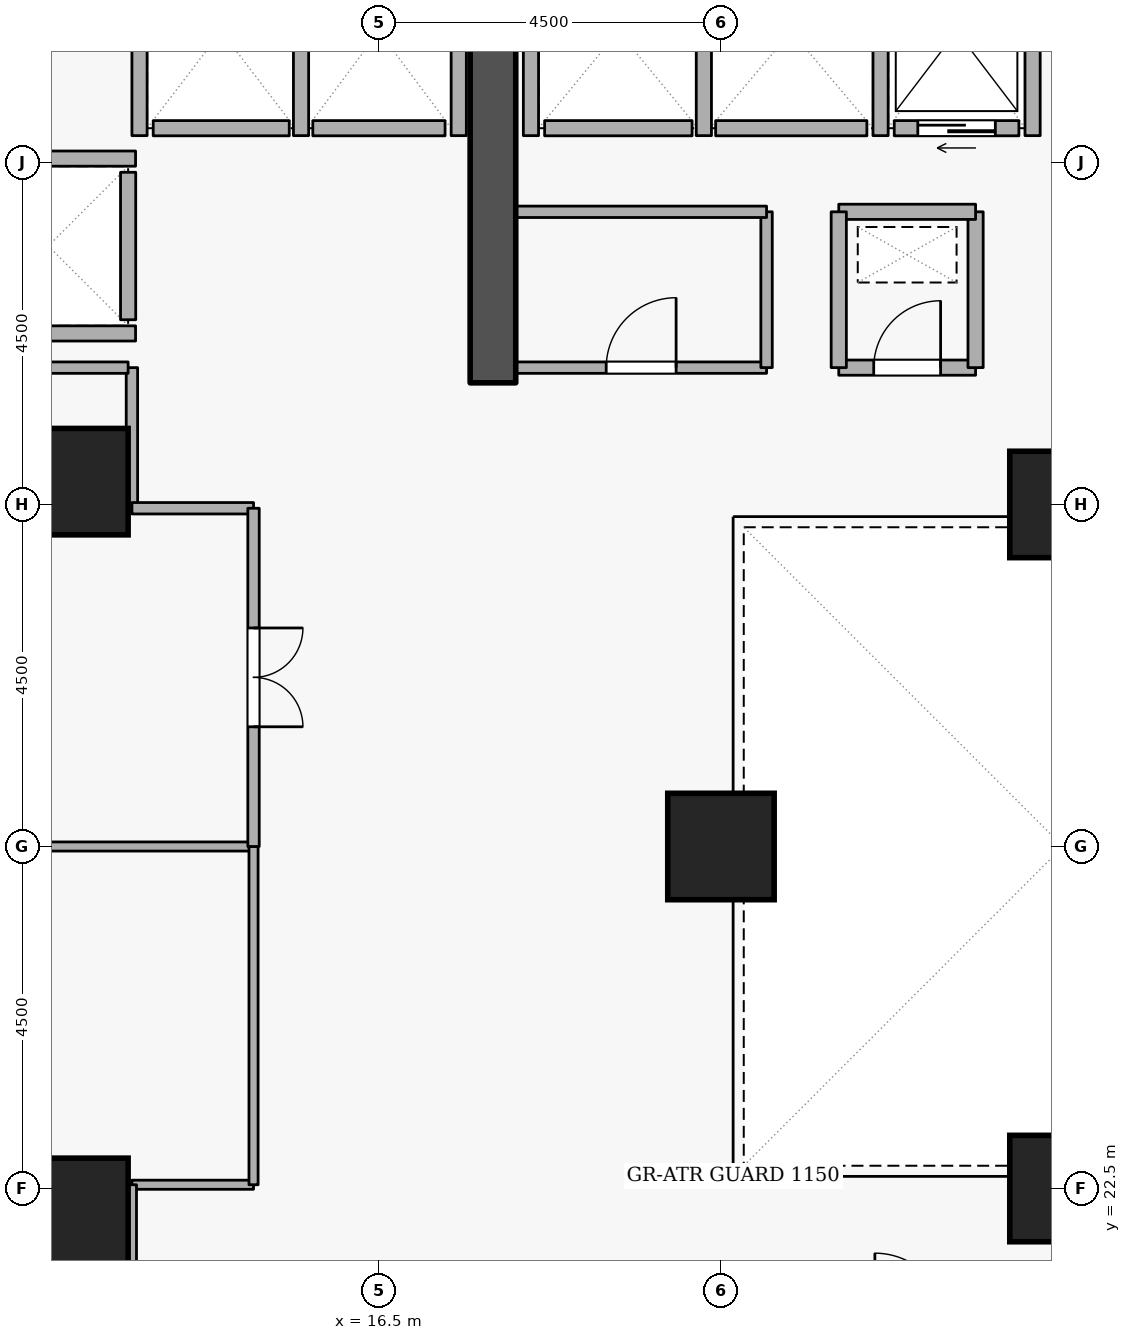
"""IFC4 building model, lengths in metres.
Left out: names, types, materials, properties, quantities, classifications, styles, units other than length and angle.
Written with IfcOpenShell. Run it as: python <this file> out.ifc"""

import sys

from ifc_helpers import new_model, si_unit, direction, frame, frame_2d, origin, origin_2d, place, context, subcontext, project, spatial, rectangle, extrude, element, fill, save


model = new_model("IFC4")
c1 = context("Model", 3, precision=1e-05, world=origin(), true_north=direction((0.0, 1.0)))
c2 = subcontext(c1, "Body", "Model", "MODEL_VIEW")
j1 = project(units=[si_unit("LENGTHUNIT", "METRE"), si_unit("PLANEANGLEUNIT", "RADIAN")], contexts=[c1])
p1 = place(None, origin())
s1 = spatial("IfcSite", under=j1, at=p1, CompositionType="ELEMENT")
p2 = place(p1, origin())
s2 = spatial("IfcBuilding", under=s1, at=p2, CompositionType="ELEMENT")
p3 = place(p2, frame((0.0, 0.0, 27.9)))
s3 = spatial("IfcBuildingStorey", under=s2, at=p3, CompositionType="ELEMENT", Elevation=27.9)
p4 = place(p3, frame((18.0, 33.1, 0.0), z_axis=(0.0, 0.0, 1.0), x_axis=(0.0, 1.0, 0.0)))
e1 = element("IfcWall", 1, at=p4, inside=s3, PredefinedType="SHEAR", context=c2, shape_type="SweptSolid", body=[
    extrude(rectangle(XDim=5.7, YDim=0.6, at=frame_2d((2.85, 0.0))), origin(), (0.0, 0.0, 1.0), 3.6),
])
for number, where, z_axis, x_axis in (
    (2, (12.5, 22.2, 0.0), (0.0, 0.0, 1.0), (1.0, 0.0, 0.0)),
    (3, (12.5, 31.8, 0.0), (0.0, 0.0, 1.0), (1.0, 0.0, 0.0)),
    (4, (25.5, 22.5, 0.0), (0.0, 0.0, 1.0), (1.0, 0.0, 0.0)),
    (5, (25.5, 31.5, 0.0), (0.0, 0.0, 1.0), (1.0, 0.0, 0.0)),
    (6, (21.0, 27.0, 0.0), (0.0, 0.0, 1.0), (1.0, 0.0, 0.0)),
):
    element("IfcColumn", number, at=place(p3, frame(where, z_axis=z_axis, x_axis=x_axis)), inside=s3, PredefinedType="COLUMN", context=c2, shape_type="SweptSolid", body=[
        extrude(rectangle(XDim=1.4, YDim=1.4, at=origin_2d()), origin(), (0.0, 0.0, 1.0), 3.6),
    ])
p5 = place(p3, frame((24.92, 36.45, 0.0), z_axis=(0.0, 0.0, 1.0), x_axis=(-1.0, 0.0, 0.0)))
e7 = element("IfcWall", 7, at=p5, inside=s3, PredefinedType="STANDARD", context=c2, shape_type="SweptSolid", body=[
    extrude(rectangle(XDim=1.64, YDim=0.2, at=frame_2d((0.82, 0.0))), origin(), (0.0, 0.0, 1.0), 3.34),
])
p6 = place(p5, frame((0.31, 0.0, 0.0)))
e8 = element("IfcOpeningElement", 8, at=p6, cuts=e7, PredefinedType="OPENING", context=c2, shape_type="SweptSolid", body=[
    extrude(rectangle(XDim=1.02, YDim=2.06, at=frame_2d((0.51, 1.03))), frame((0.0, 0.11, 0.0), z_axis=(0.0, -1.0, 0.0), x_axis=(1.0, 0.0, 0.0)), (0.0, 0.0, 1.0), 0.22),
])
p7 = place(p3, frame((22.92, 36.45, 0.0), z_axis=(0.0, 0.0, 1.0), x_axis=(-1.0, 0.0, 0.0)))
e9 = element("IfcWall", 9, at=p7, inside=s3, PredefinedType="STANDARD", context=c2, shape_type="SweptSolid", body=[
    extrude(rectangle(XDim=1.99, YDim=0.2, at=frame_2d((0.995, 0.0))), origin(), (0.0, 0.0, 1.0), 3.34),
])
p8 = place(p3, frame((20.62, 36.45, 0.0), z_axis=(0.0, 0.0, 1.0), x_axis=(-1.0, 0.0, 0.0)))
e10 = element("IfcWall", 10, at=p8, inside=s3, PredefinedType="STANDARD", context=c2, shape_type="SweptSolid", body=[
    extrude(rectangle(XDim=1.94, YDim=0.2, at=frame_2d((0.97, 0.0))), origin(), (0.0, 0.0, 1.0), 3.34),
])
p9 = place(p3, frame((17.37, 36.45, 0.0), z_axis=(0.0, 0.0, 1.0), x_axis=(-1.0, 0.0, 0.0)))
e11 = element("IfcWall", 11, at=p9, inside=s3, PredefinedType="STANDARD", context=c2, shape_type="SweptSolid", body=[
    extrude(rectangle(XDim=1.74, YDim=0.2, at=frame_2d((0.87, 0.0))), origin(), (0.0, 0.0, 1.0), 3.34),
])
p10 = place(p3, frame((15.32, 36.45, 0.0), z_axis=(0.0, 0.0, 1.0), x_axis=(-1.0, 0.0, 0.0)))
e12 = element("IfcWall", 12, at=p10, inside=s3, PredefinedType="STANDARD", context=c2, shape_type="SweptSolid", body=[
    extrude(rectangle(XDim=1.79, YDim=0.2, at=frame_2d((0.895, 0.0))), origin(), (0.0, 0.0, 1.0), 3.34),
])
p11 = place(p3, frame((13.2, 33.93, 0.0), z_axis=(0.0, 0.0, 1.0), x_axis=(0.0, 1.0, 0.0)))
e13 = element("IfcWall", 13, at=p11, inside=s3, PredefinedType="STANDARD", context=c2, shape_type="SweptSolid", body=[
    extrude(rectangle(XDim=1.94, YDim=0.2, at=frame_2d((0.97, 0.0))), origin(), (0.0, 0.0, 1.0), 3.34),
])
for number, where, z_axis, x_axis in (
    (14, (25.1, 36.352, 0.0), (0.0, 0.0, 1.0), (0.0, 1.0, 0.0)),
    (15, (23.1, 36.352, 0.0), (0.0, 0.0, 1.0), (0.0, 1.0, 0.0)),
    (16, (20.775, 36.352, 0.0), (0.0, 0.0, 1.0), (0.0, 1.0, 0.0)),
    (17, (18.5, 36.352, 0.0), (0.0, 0.0, 1.0), (0.0, 1.0, 0.0)),
):
    element("IfcWall", number, at=place(p3, frame(where, z_axis=z_axis, x_axis=x_axis)), inside=s3, PredefinedType="STANDARD", context=c2, shape_type="SweptSolid", body=[
        extrude(rectangle(XDim=2.436, YDim=0.2, at=frame_2d((1.218, 0.0))), origin(), (0.0, 0.0, 1.0), 3.34),
    ])
p12 = place(p3, frame((17.55, 36.352, 0.0), z_axis=(0.0, 0.0, 1.0), x_axis=(0.0, 1.0, 0.0)))
e18 = element("IfcWall", 18, at=p12, inside=s3, PredefinedType="STANDARD", context=c2, shape_type="SweptSolid", body=[
    extrude(rectangle(XDim=2.636, YDim=0.2, at=frame_2d((1.318, 0.0))), origin(), (0.0, 0.0, 1.0), 2.545),
])
for number, where, z_axis, x_axis in (
    (19, (15.475, 36.352, 0.0), (0.0, 0.0, 1.0), (0.0, 1.0, 0.0)),
    (20, (13.35, 36.352, 0.0), (0.0, 0.0, 1.0), (0.0, 1.0, 0.0)),
):
    element("IfcWall", number, at=place(p3, frame(where, z_axis=z_axis, x_axis=x_axis)), inside=s3, PredefinedType="STANDARD", context=c2, shape_type="SweptSolid", body=[
        extrude(rectangle(XDim=2.636, YDim=0.2, at=frame_2d((1.318, 0.0))), origin(), (0.0, 0.0, 1.0), 3.34),
    ])
for number, where, z_axis, x_axis in (
    (21, (11.002, 36.05, 0.0), (0.0, 0.0, 1.0), (1.0, 0.0, 0.0)),
    (22, (11.002, 33.75, 0.0), (0.0, 0.0, 1.0), (1.0, 0.0, 0.0)),
):
    element("IfcWall", number, at=place(p3, frame(where, z_axis=z_axis, x_axis=x_axis)), inside=s3, PredefinedType="STANDARD", context=c2, shape_type="SweptSolid", body=[
        extrude(rectangle(XDim=2.296, YDim=0.2, at=frame_2d((1.148, 0.0))), origin(), (0.0, 0.0, 1.0), 3.34),
    ])
p13 = place(p3, frame((22.55, 33.3, 0.0), z_axis=(0.0, 0.0, 1.0), x_axis=(1.0, 0.0, 0.0)))
e23 = element("IfcWall", 23, at=p13, inside=s3, PredefinedType="STANDARD", context=c2, shape_type="SweptSolid", body=[
    extrude(rectangle(XDim=1.8, YDim=0.2, at=frame_2d((0.9, 0.0))), origin(), (0.0, 0.0, 1.0), 3.34),
])
p14 = place(p13, frame((0.46, 0.0, 0.0)))
e24 = element("IfcOpeningElement", 24, at=p14, cuts=e23, PredefinedType="OPENING", context=c2, shape_type="SweptSolid", body=[
    extrude(rectangle(XDim=0.88, YDim=2.04, at=frame_2d((0.44, 1.02))), frame((0.0, 0.11, 0.0), z_axis=(0.0, -1.0, 0.0), x_axis=(1.0, 0.0, 0.0)), (0.0, 0.0, 1.0), 0.22),
])
p15 = place(p3, frame((24.35, 33.3, 0.0), z_axis=(0.0, 0.0, 1.0), x_axis=(0.0, 1.0, 0.0)))
e25 = element("IfcWall", 25, at=p15, inside=s3, PredefinedType="STANDARD", context=c2, shape_type="SweptSolid", body=[
    extrude(rectangle(XDim=2.05, YDim=0.2, at=frame_2d((1.025, 0.0))), origin(), (0.0, 0.0, 1.0), 3.34),
])
p16 = place(p3, frame((24.35, 35.35, 0.0), z_axis=(0.0, 0.0, 1.0), x_axis=(-1.0, 0.0, 0.0)))
e26 = element("IfcWall", 26, at=p16, inside=s3, PredefinedType="STANDARD", context=c2, shape_type="SweptSolid", body=[
    extrude(rectangle(XDim=1.8, YDim=0.2, at=frame_2d((0.9, 0.0))), origin(), (0.0, 0.0, 1.0), 3.34),
])
p17 = place(p3, frame((22.55, 35.35, 0.0), z_axis=(0.0, 0.0, 1.0), x_axis=(0.0, -1.0, 0.0)))
e27 = element("IfcWall", 27, at=p17, inside=s3, PredefinedType="STANDARD", context=c2, shape_type="SweptSolid", body=[
    extrude(rectangle(XDim=2.05, YDim=0.2, at=frame_2d((1.025, 0.0))), origin(), (0.0, 0.0, 1.0), 3.34),
])
p18 = place(p3, frame((18.3, 33.3, 0.0), z_axis=(0.0, 0.0, 1.0), x_axis=(1.0, 0.0, 0.0)))
e28 = element("IfcWall", 28, at=p18, inside=s3, PredefinedType="PARTITIONING", context=c2, shape_type="SweptSolid", body=[
    extrude(rectangle(XDim=3.3, YDim=0.15, at=frame_2d((1.65, 0.0))), origin(), (0.0, 0.0, 1.0), 3.34),
])
p19 = place(p18, frame((1.19, 0.0, 0.0)))
e29 = element("IfcOpeningElement", 29, at=p19, cuts=e28, PredefinedType="OPENING", context=c2, shape_type="SweptSolid", body=[
    extrude(rectangle(XDim=0.92, YDim=2.08, at=frame_2d((0.46, 1.04))), frame((0.0, 0.085, 0.0), z_axis=(0.0, -1.0, 0.0), x_axis=(1.0, 0.0, 0.0)), (0.0, 0.0, 1.0), 0.17),
])
p20 = place(p3, frame((21.6, 33.3, 0.0), z_axis=(0.0, 0.0, 1.0), x_axis=(0.0, 1.0, 0.0)))
e30 = element("IfcWall", 30, at=p20, inside=s3, PredefinedType="PARTITIONING", context=c2, shape_type="SweptSolid", body=[
    extrude(rectangle(XDim=2.05, YDim=0.15, at=frame_2d((1.025, 0.0))), origin(), (0.0, 0.0, 1.0), 3.34),
])
p21 = place(p3, frame((21.6, 35.35, 0.0), z_axis=(0.0, 0.0, 1.0), x_axis=(-1.0, 0.0, 0.0)))
e31 = element("IfcWall", 31, at=p21, inside=s3, PredefinedType="PARTITIONING", context=c2, shape_type="SweptSolid", body=[
    extrude(rectangle(XDim=3.3, YDim=0.15, at=frame_2d((1.65, 0.0))), origin(), (0.0, 0.0, 1.0), 3.34),
])
p22 = place(p3, frame((14.85, 22.55, 0.0), z_axis=(0.0, 0.0, 1.0), x_axis=(-1.0, 0.0, 0.0)))
e32 = element("IfcWall", 32, at=p22, inside=s3, PredefinedType="PARTITIONING", context=c2, shape_type="SweptSolid", body=[
    extrude(rectangle(XDim=1.6, YDim=0.12, at=frame_2d((0.8, 0.0))), origin(), (0.0, 0.0, 1.0), 3.34),
])
p23 = place(p3, frame((13.25, 22.55, 0.0), z_axis=(0.0, 0.0, 1.0), x_axis=(0.0, -1.0, 0.0)))
e33 = element("IfcWall", 33, at=p23, inside=s3, PredefinedType="PARTITIONING", context=c2, shape_type="SweptSolid", body=[
    extrude(rectangle(XDim=1.85, YDim=0.12, at=frame_2d((0.925, 0.0))), origin(), (0.0, 0.0, 1.0), 3.34),
])
p24 = place(p3, frame((1.28, 27.0, 0.0), z_axis=(0.0, 0.0, 1.0), x_axis=(1.0, 0.0, 0.0)))
e34 = element("IfcWall", 34, at=p24, inside=s3, PredefinedType="PARTITIONING", context=c2, shape_type="SweptSolid", body=[
    extrude(rectangle(XDim=13.57, YDim=0.12, at=frame_2d((6.785, 0.0))), origin(), (0.0, 0.0, 1.0), 2.878),
])
p25 = place(p3, frame((14.85, 27.0, 0.0), z_axis=(0.0, 0.0, 1.0), x_axis=(0.0, -1.0, 0.0)))
e35 = element("IfcWall", 35, at=p25, inside=s3, PredefinedType="PARTITIONING", context=c2, shape_type="SweptSolid", body=[
    extrude(rectangle(XDim=4.45, YDim=0.12, at=frame_2d((2.225, 0.0))), origin(), (0.0, 0.0, 1.0), 3.34),
])
p26 = place(p3, frame((13.25, 33.3, 0.0), z_axis=(0.0, 0.0, 1.0), x_axis=(0.0, -1.0, 0.0)))
e36 = element("IfcWall", 36, at=p26, inside=s3, PredefinedType="PARTITIONING", context=c2, shape_type="SweptSolid", body=[
    extrude(rectangle(XDim=1.85, YDim=0.15, at=frame_2d((0.925, 0.0))), origin(), (0.0, 0.0, 1.0), 3.34),
])
p27 = place(p3, frame((13.25, 31.45, 0.0), z_axis=(0.0, 0.0, 1.0), x_axis=(1.0, 0.0, 0.0)))
e37 = element("IfcWall", 37, at=p27, inside=s3, PredefinedType="PARTITIONING", context=c2, shape_type="SweptSolid", body=[
    extrude(rectangle(XDim=1.6, YDim=0.15, at=frame_2d((0.8, 0.0))), origin(), (0.0, 0.0, 1.0), 3.34),
])
p28 = place(p3, frame((14.85, 31.45, 0.0), z_axis=(0.0, 0.0, 1.0), x_axis=(0.0, -1.0, 0.0)))
e38 = element("IfcWall", 38, at=p28, inside=s3, PredefinedType="PARTITIONING", context=c2, shape_type="SweptSolid", body=[
    extrude(rectangle(XDim=4.45, YDim=0.15, at=frame_2d((2.225, 0.0))), origin(), (0.0, 0.0, 1.0), 3.34),
])
p29 = place(p28, frame((1.575, 0.0, 0.0)))
e39 = element("IfcOpeningElement", 39, at=p29, cuts=e38, PredefinedType="OPENING", context=c2, shape_type="SweptSolid", body=[
    extrude(rectangle(XDim=1.3, YDim=2.12, at=frame_2d((0.65, 1.06))), frame((0.0, 0.085, 0.0), z_axis=(0.0, -1.0, 0.0), x_axis=(1.0, 0.0, 0.0)), (0.0, 0.0, 1.0), 0.17),
])
p30 = place(p3, frame((10.9, 33.3, 0.0), z_axis=(0.0, 0.0, 1.0), x_axis=(1.0, 0.0, 0.0)))
e40 = element("IfcWall", 40, at=p30, inside=s3, PredefinedType="PARTITIONING", context=c2, shape_type="SweptSolid", body=[
    extrude(rectangle(XDim=2.3, YDim=0.15, at=frame_2d((1.15, 0.0))), origin(), (0.0, 0.0, 1.0), 3.34),
])
p31 = place(p6, origin())
e41 = element("IfcDoor", 41, at=p31, inside=s3, OperationType="SLIDING_TO_LEFT", PredefinedType="DOOR", context=c2, shape_type="SweptSolid", body=[
    extrude(rectangle(XDim=1.02, YDim=2.06, at=frame_2d((0.51, 1.03))), frame((0.0, 0.025, 0.0), z_axis=(0.0, -1.0, 0.0), x_axis=(1.0, 0.0, 0.0)), (0.0, 0.0, 1.0), 0.05),
])
fill(e8, e41)
p32 = place(p14, origin())
e42 = element("IfcDoor", 42, at=p32, inside=s3, OperationType="SINGLE_SWING_RIGHT", PredefinedType="DOOR", context=c2, shape_type="SweptSolid", body=[
    extrude(rectangle(XDim=0.88, YDim=2.04, at=frame_2d((0.44, 1.02))), frame((0.0, 0.025, 0.0), z_axis=(0.0, -1.0, 0.0), x_axis=(1.0, 0.0, 0.0)), (0.0, 0.0, 1.0), 0.05),
])
fill(e24, e42)
p33 = place(p19, origin())
e43 = element("IfcDoor", 43, at=p33, inside=s3, OperationType="SINGLE_SWING_RIGHT", PredefinedType="DOOR", context=c2, shape_type="SweptSolid", body=[
    extrude(rectangle(XDim=0.92, YDim=2.08, at=frame_2d((0.46, 1.04))), frame((0.0, 0.025, 0.0), z_axis=(0.0, -1.0, 0.0), x_axis=(1.0, 0.0, 0.0)), (0.0, 0.0, 1.0), 0.05),
])
fill(e29, e43)
p34 = place(p29, origin())
e44 = element("IfcDoor", 44, at=p34, inside=s3, OperationType="DOUBLE_DOOR_SINGLE_SWING", PredefinedType="DOOR", context=c2, shape_type="SweptSolid", body=[
    extrude(rectangle(XDim=1.3, YDim=2.12, at=frame_2d((0.65, 1.06))), frame((0.0, 0.025, 0.0), z_axis=(0.0, -1.0, 0.0), x_axis=(1.0, 0.0, 0.0)), (0.0, 0.0, 1.0), 0.05),
])
fill(e39, e44)
save(model, sys.argv[1])
